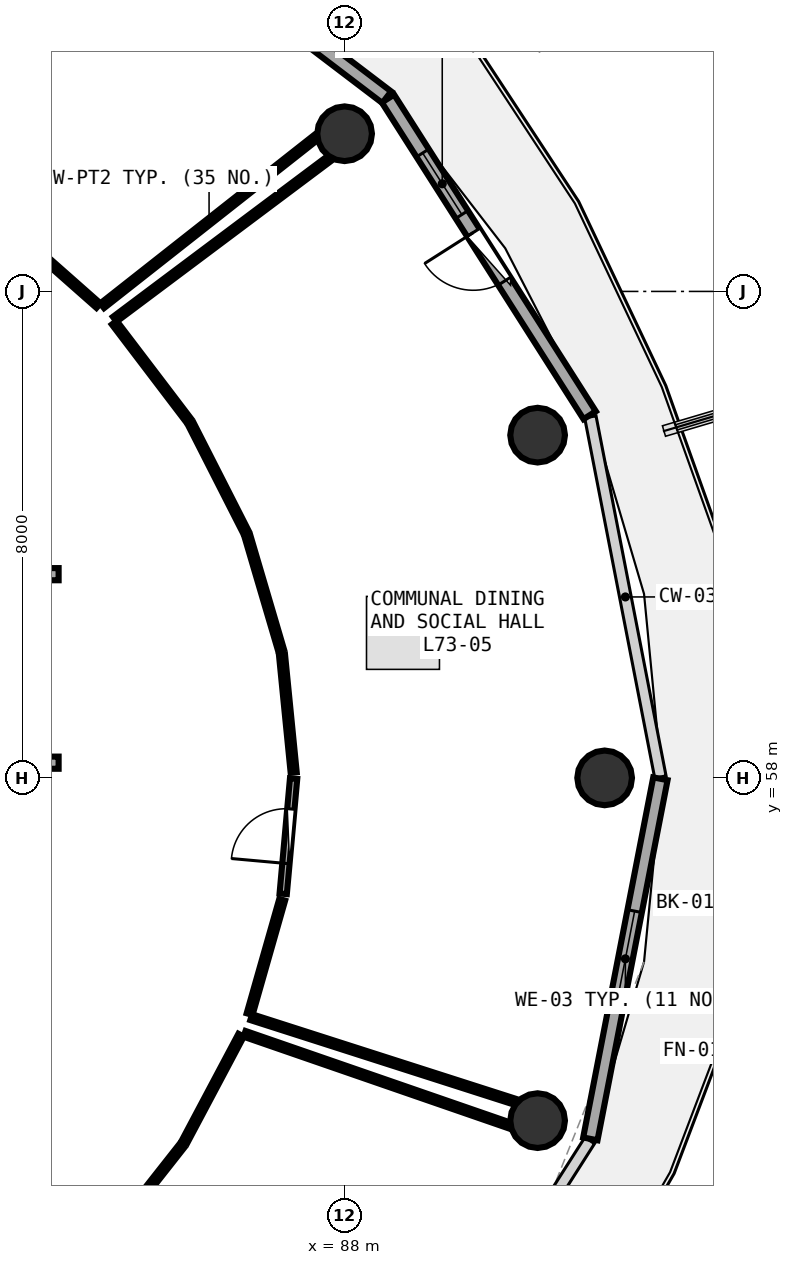
"""IFC4 building model, lengths in metres.
Left out: names, types, materials, properties, quantities, classifications, styles, units other than length and angle.
Written with IfcOpenShell. Run it as: python <this file> out.ifc"""

import sys

from ifc_helpers import new_model, si_unit, direction, frame, frame_2d, origin, origin_2d, place, context, subcontext, project, spatial, rectangle, circle, extrude, element, fill, save


model = new_model("IFC4")
c1 = context("Model", 3, precision=1e-05, world=origin(), true_north=direction((0.0, 1.0)))
c2 = subcontext(c1, "Body", "Model", "MODEL_VIEW")
j1 = project(units=[si_unit("LENGTHUNIT", "METRE"), si_unit("PLANEANGLEUNIT", "RADIAN")], contexts=[c1])
p1 = place(None, origin())
s1 = spatial("IfcSite", under=j1, at=p1, CompositionType="ELEMENT")
p2 = place(p1, origin())
s2 = spatial("IfcBuilding", under=s1, at=p2, CompositionType="ELEMENT")
p3 = place(p2, frame((0.0, 0.0, 286.2)))
s3 = spatial("IfcBuildingStorey", under=s2, at=p3, CompositionType="ELEMENT", Elevation=286.2)
for number, where, z_axis, x_axis in (
    (1, (92.28, 58.0, 0.0), (0.0, 0.0, 1.0), (1.0, 0.0, 0.0)),
    (2, (91.177, 63.636, 0.0), (0.0, 0.0, 1.0), (1.0, 0.0, 0.0)),
    (3, (88.003, 68.593, 0.0), (0.0, 0.0, 1.0), (1.0, 0.0, 0.0)),
    (4, (91.177, 52.364, 0.0), (0.0, 0.0, 1.0), (1.0, 0.0, 0.0)),
):
    element("IfcColumn", number, at=place(p3, frame(where, z_axis=z_axis, x_axis=x_axis)), inside=s3, PredefinedType="COLUMN", context=c2, shape_type="SweptSolid", body=[
        extrude(circle(Radius=0.45, at=origin_2d()), origin(), (0.0, 0.0, 1.0), 3.75),
    ])
p4 = place(p3, frame((92.034, 63.964, 0.0), z_axis=(0.0, 0.0, 1.0), x_axis=(-0.537271968456, 0.843409053728, 0.0)))
e5 = element("IfcWall", 5, at=p4, inside=s3, PredefinedType="SOLIDWALL", context=c2, shape_type="SweptSolid", body=[
    extrude(rectangle(XDim=6.175, YDim=0.24, at=frame_2d((3.087, 0.0))), origin(), (0.0, 0.0, 1.0), 3.475),
])
p5 = place(p4, frame((2.613, 0.0, 0.0)))
e6 = element("IfcOpeningElement", 6, at=p5, cuts=e5, PredefinedType="OPENING", context=c2, shape_type="SweptSolid", body=[
    extrude(rectangle(XDim=0.95, YDim=2.1, at=frame_2d((0.475, 1.05))), frame((0.0, 0.13, 0.0), z_axis=(0.0, -1.0, 0.0), x_axis=(1.0, 0.0, 0.0)), (0.0, 0.0, 1.0), 0.26),
])
p6 = place(p4, frame((3.913, 0.0, 0.85)))
e7 = element("IfcOpeningElement", 7, at=p6, cuts=e5, PredefinedType="OPENING", context=c2, shape_type="SweptSolid", body=[
    extrude(rectangle(XDim=1.2, YDim=1.45, at=frame_2d((0.6, 0.725))), frame((0.0, 0.13, 0.0), z_axis=(0.0, -1.0, 0.0), x_axis=(1.0, 0.0, 0.0)), (0.0, 0.0, 1.0), 0.26),
])
p7 = place(p3, frame((88.696, 69.194, 0.0), z_axis=(0.0, 0.0, 1.0), x_axis=(-0.796010444211, 0.605282886514, 0.0)))
e8 = element("IfcWall", 8, at=p7, inside=s3, PredefinedType="SOLIDWALL", context=c2, shape_type="SweptSolid", body=[
    extrude(rectangle(XDim=6.387, YDim=0.24, at=frame_2d((3.194, 0.0))), origin(), (0.0, 0.0, 1.0), 3.475),
])
p8 = place(p7, frame((2.719, 0.0, 0.0)))
e9 = element("IfcOpeningElement", 9, at=p8, cuts=e8, PredefinedType="OPENING", context=c2, shape_type="SweptSolid", body=[
    extrude(rectangle(XDim=0.95, YDim=2.1, at=frame_2d((0.475, 1.05))), frame((0.0, 0.13, 0.0), z_axis=(0.0, -1.0, 0.0), x_axis=(1.0, 0.0, 0.0)), (0.0, 0.0, 1.0), 0.26),
])
p9 = place(p7, frame((4.019, 0.0, 0.85)))
e10 = element("IfcOpeningElement", 10, at=p9, cuts=e8, PredefinedType="OPENING", context=c2, shape_type="SweptSolid", body=[
    extrude(rectangle(XDim=1.2, YDim=1.45, at=frame_2d((0.6, 0.725))), frame((0.0, 0.13, 0.0), z_axis=(0.0, -1.0, 0.0), x_axis=(1.0, 0.0, 0.0)), (0.0, 0.0, 1.0), 0.26),
])
p10 = place(p3, frame((92.045, 52.063, 0.0), z_axis=(0.0, 0.0, 1.0), x_axis=(0.190969309115, 0.981596008028, 0.0)))
e11 = element("IfcWall", 11, at=p10, inside=s3, PredefinedType="SOLIDWALL", context=c2, shape_type="SweptSolid", body=[
    extrude(rectangle(XDim=6.033, YDim=0.24, at=frame_2d((3.017, 0.0))), origin(), (0.0, 0.0, 1.0), 3.475),
])
p11 = place(p10, frame((2.216, 0.0, 0.85)))
e12 = element("IfcOpeningElement", 12, at=p11, cuts=e11, PredefinedType="OPENING", context=c2, shape_type="SweptSolid", body=[
    extrude(rectangle(XDim=1.6, YDim=1.45, at=frame_2d((0.8, 0.725))), frame((0.0, 0.13, 0.0), z_axis=(0.0, -1.0, 0.0), x_axis=(1.0, 0.0, 0.0)), (0.0, 0.0, 1.0), 0.26),
])
p12 = place(p3, frame((79.3, 61.35, 0.0), z_axis=(0.0, 0.0, 1.0), x_axis=(1.0, 0.0, 0.0)))
e13 = element("IfcWall", 13, at=p12, inside=s3, PredefinedType="SOLIDWALL", context=c2, shape_type="SweptSolid", body=[
    extrude(rectangle(XDim=4.0, YDim=0.2, at=frame_2d((2.0, 0.0))), origin(), (0.0, 0.0, 1.0), 2.775),
])
p13 = place(p12, frame((0.45, 0.0, 0.0)))
e14 = element("IfcOpeningElement", 14, at=p13, cuts=e13, PredefinedType="OPENING", context=c2, shape_type="SweptSolid", body=[
    extrude(rectangle(XDim=1.2, YDim=2.15, at=frame_2d((0.6, 1.075))), frame((0.0, 0.11, 0.0), z_axis=(0.0, -1.0, 0.0), x_axis=(1.0, 0.0, 0.0)), (0.0, 0.0, 1.0), 0.22),
])
p14 = place(p3, frame((79.3, 58.25, 0.0), z_axis=(0.0, 0.0, 1.0), x_axis=(1.0, 0.0, 0.0)))
e15 = element("IfcWall", 15, at=p14, inside=s3, PredefinedType="SOLIDWALL", context=c2, shape_type="SweptSolid", body=[
    extrude(rectangle(XDim=4.0, YDim=0.2, at=frame_2d((2.0, 0.0))), origin(), (0.0, 0.0, 1.0), 2.775),
])
p15 = place(p14, frame((0.5, 0.0, 0.0)))
e16 = element("IfcOpeningElement", 16, at=p15, cuts=e15, PredefinedType="OPENING", context=c2, shape_type="SweptSolid", body=[
    extrude(rectangle(XDim=1.1, YDim=2.1, at=frame_2d((0.55, 1.05))), frame((0.0, 0.11, 0.0), z_axis=(0.0, -1.0, 0.0), x_axis=(1.0, 0.0, 0.0)), (0.0, 0.0, 1.0), 0.22),
])
p16 = place(p3, frame((86.993, 56.094, 0.0), z_axis=(0.0, 0.0, 1.0), x_axis=(0.089968706127, 0.995944592795, 0.0)))
e17 = element("IfcWall", 17, at=p16, inside=s3, PredefinedType="PARTITIONING", context=c2, shape_type="SweptSolid", body=[
    extrude(rectangle(XDim=1.902, YDim=0.12, at=frame_2d((0.951, 0.0))), origin(), (0.0, 0.0, 1.0), 3.075),
])
p17 = place(p16, frame((0.501, 0.0, 0.0)))
e18 = element("IfcOpeningElement", 18, at=p17, cuts=e17, PredefinedType="OPENING", context=c2, shape_type="SweptSolid", body=[
    extrude(rectangle(XDim=0.9, YDim=2.08, at=frame_2d((0.45, 1.04))), frame((0.0, 0.07, 0.0), z_axis=(0.0, -1.0, 0.0), x_axis=(1.0, 0.0, 0.0)), (0.0, 0.0, 1.0), 0.14),
])
p18 = place(p3, frame((84.079, 50.365, 0.0), z_axis=(0.0, 0.0, 1.0), x_axis=(0.618820199788, 0.785532660259, 0.0)))
e19 = element("IfcWall", 19, at=p18, inside=s3, PredefinedType="PARTITIONING", context=c2, shape_type="SweptSolid", body=[
    extrude(rectangle(XDim=2.018, YDim=0.1, at=frame_2d((1.009, 0.0))), origin(), (0.0, 0.0, 1.0), 3.075),
])
p19 = place(p3, frame((85.371, 52.016, 0.0), z_axis=(0.0, 0.0, 1.0), x_axis=(0.468933294906, 0.883233584579, 0.0)))
e20 = element("IfcWall", 20, at=p19, inside=s3, PredefinedType="PARTITIONING", context=c2, shape_type="SweptSolid", body=[
    extrude(rectangle(XDim=1.984, YDim=0.1, at=frame_2d((0.992, 0.0))), origin(), (0.0, 0.0, 1.0), 3.235),
])
p20 = place(p3, frame((86.358, 53.791, 0.0), z_axis=(0.0, 0.0, 1.0), x_axis=(0.945103281494, -0.326771766388, 0.0)))
e21 = element("IfcWall", 21, at=p20, inside=s3, PredefinedType="PARTITIONING", context=c2, shape_type="SweptSolid", body=[
    extrude(rectangle(XDim=4.604, YDim=0.1, at=frame_2d((2.302, 0.0))), origin(), (0.0, 0.0, 1.0), 3.075),
])
p21 = place(p3, frame((86.441, 54.115, 0.0), z_axis=(0.0, 0.0, 1.0), x_axis=(0.274226302341, 0.961665188673, 0.0)))
e22 = element("IfcWall", 22, at=p21, inside=s3, PredefinedType="PARTITIONING", context=c2, shape_type="SweptSolid", body=[
    extrude(rectangle(XDim=1.955, YDim=0.1, at=frame_2d((0.978, 0.0))), origin(), (0.0, 0.0, 1.0), 3.48),
])
p22 = place(p3, frame((87.166, 58.088, 0.0), z_axis=(0.0, 0.0, 1.0), x_axis=(-0.098769631998, 0.995110325439, 0.0)))
e23 = element("IfcWall", 23, at=p22, inside=s3, PredefinedType="PARTITIONING", context=c2, shape_type="SweptSolid", body=[
    extrude(rectangle(XDim=1.943, YDim=0.1, at=frame_2d((0.971, 0.0))), origin(), (0.0, 0.0, 1.0), 3.075),
])
p23 = place(p3, frame((86.959, 60.099, 0.0), z_axis=(0.0, 0.0, 1.0), x_axis=(-0.28293653612, 0.959138632591, 0.0)))
e24 = element("IfcWall", 24, at=p23, inside=s3, PredefinedType="PARTITIONING", context=c2, shape_type="SweptSolid", body=[
    extrude(rectangle(XDim=1.956, YDim=0.1, at=frame_2d((0.978, 0.0))), origin(), (0.0, 0.0, 1.0), 3.48),
])
p24 = place(p3, frame((86.376, 62.05, 0.0), z_axis=(0.0, 0.0, 1.0), x_axis=(-0.453658133306, 0.891175795276, 0.0)))
e25 = element("IfcWall", 25, at=p24, inside=s3, PredefinedType="PARTITIONING", context=c2, shape_type="SweptSolid", body=[
    extrude(rectangle(XDim=1.981, YDim=0.1, at=frame_2d((0.991, 0.0))), origin(), (0.0, 0.0, 1.0), 3.235),
])
p25 = place(p3, frame((85.435, 63.883, 0.0), z_axis=(0.0, 0.0, 1.0), x_axis=(-0.605473441765, 0.795865510823, 0.0)))
e26 = element("IfcWall", 26, at=p25, inside=s3, PredefinedType="PARTITIONING", context=c2, shape_type="SweptSolid", body=[
    extrude(rectangle(XDim=2.014, YDim=0.1, at=frame_2d((1.007, 0.0))), origin(), (0.0, 0.0, 1.0), 3.075),
])
p26 = place(p3, frame((84.223, 65.542, 0.0), z_axis=(0.0, 0.0, 1.0), x_axis=(0.800384816546, 0.599486568191, 0.0)))
e27 = element("IfcWall", 27, at=p26, inside=s3, PredefinedType="PARTITIONING", context=c2, shape_type="SweptSolid", body=[
    extrude(rectangle(XDim=4.414, YDim=0.1, at=frame_2d((2.207, 0.0))), origin(), (0.0, 0.0, 1.0), 3.175),
])
p27 = place(p3, frame((90.816, 52.671, 0.0), z_axis=(0.0, 0.0, 1.0), x_axis=(-0.95227750557, 0.305233602976, 0.0)))
e28 = element("IfcWall", 28, at=p27, inside=s3, PredefinedType="PARTITIONING", context=c2, shape_type="SweptSolid", body=[
    extrude(rectangle(XDim=4.565, YDim=0.1, at=frame_2d((2.283, 0.0))), origin(), (0.0, 0.0, 1.0), 3.175),
])
p28 = place(p3, frame((83.955, 65.767, 0.0), z_axis=(0.0, 0.0, 1.0), x_axis=(-0.749539941976, 0.661959119117, 0.0)))
e29 = element("IfcWall", 29, at=p28, inside=s3, PredefinedType="PARTITIONING", context=c2, shape_type="SweptSolid", body=[
    extrude(rectangle(XDim=2.057, YDim=0.1, at=frame_2d((1.029, 0.0))), origin(), (0.0, 0.0, 1.0), 3.075),
])
p29 = place(p3, frame((87.532, 68.532, 0.0), z_axis=(0.0, 0.0, 1.0), x_axis=(-0.785736749878, -0.618561039745, 0.0)))
e30 = element("IfcWall", 30, at=p29, inside=s3, PredefinedType="PARTITIONING", context=c2, shape_type="SweptSolid", body=[
    extrude(rectangle(XDim=4.475, YDim=0.1, at=frame_2d((2.237, 0.0))), origin(), (0.0, 0.0, 1.0), 3.075),
])
p30 = place(p5, frame((0.95, 0.0, 0.0), z_axis=(0.0, 0.0, 1.0), x_axis=(-1.0, 0.0, 0.0)))
e31 = element("IfcDoor", 31, at=p30, inside=s3, OperationType="SINGLE_SWING_LEFT", PredefinedType="DOOR", context=c2, shape_type="SweptSolid", body=[
    extrude(rectangle(XDim=0.95, YDim=2.1, at=frame_2d((0.475, 1.05))), frame((0.0, 0.025, 0.0), z_axis=(0.0, -1.0, 0.0), x_axis=(1.0, 0.0, 0.0)), (0.0, 0.0, 1.0), 0.05),
])
fill(e6, e31)
p31 = place(p6, origin())
e32 = element("IfcWindow", 32, at=p31, inside=s3, PartitioningType="SINGLE_PANEL", PredefinedType="WINDOW", context=c2, shape_type="SweptSolid", body=[
    extrude(rectangle(XDim=1.2, YDim=1.45, at=frame_2d((0.6, 0.725))), frame((0.0, 0.03, 0.0), z_axis=(0.0, -1.0, 0.0), x_axis=(1.0, 0.0, 0.0)), (0.0, 0.0, 1.0), 0.06),
])
fill(e7, e32)
p32 = place(p11, origin())
e33 = element("IfcWindow", 33, at=p32, inside=s3, PartitioningType="SINGLE_PANEL", PredefinedType="WINDOW", context=c2, shape_type="SweptSolid", body=[
    extrude(rectangle(XDim=1.6, YDim=1.45, at=frame_2d((0.8, 0.725))), frame((0.0, 0.03, 0.0), z_axis=(0.0, -1.0, 0.0), x_axis=(1.0, 0.0, 0.0)), (0.0, 0.0, 1.0), 0.06),
])
fill(e12, e33)
p33 = place(p17, origin())
e34 = element("IfcDoor", 34, at=p33, inside=s3, OperationType="SINGLE_SWING_LEFT", PredefinedType="DOOR", context=c2, shape_type="SweptSolid", body=[
    extrude(rectangle(XDim=0.9, YDim=2.08, at=frame_2d((0.45, 1.04))), frame((0.0, 0.025, 0.0), z_axis=(0.0, -1.0, 0.0), x_axis=(1.0, 0.0, 0.0)), (0.0, 0.0, 1.0), 0.05),
])
fill(e18, e34)
save(model, sys.argv[1])
